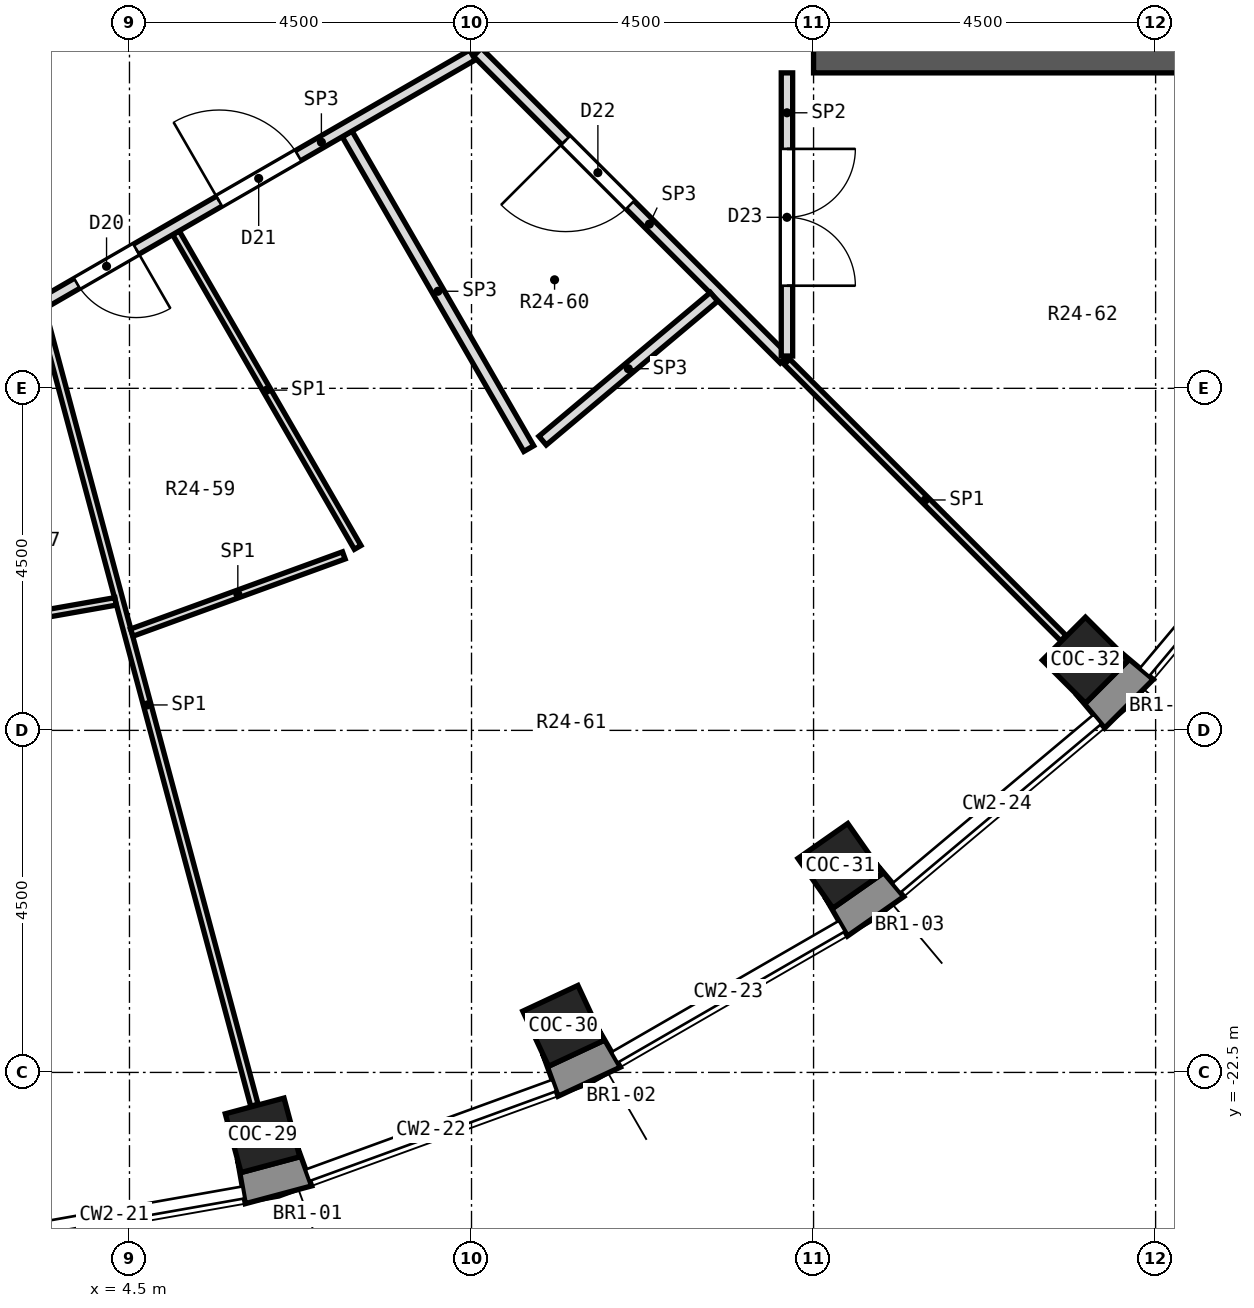
"""IFC4 building model, lengths in metres.
Left out: names, types, materials, properties, quantities, classifications, styles, units other than length and angle.
Written with IfcOpenShell. Run it as: python <this file> out.ifc"""

import sys

from ifc_helpers import new_model, si_unit, direction, frame, frame_2d, origin, origin_2d, place, context, subcontext, project, spatial, polyline, rectangle, outline, extrude, element, fill, save


model = new_model("IFC4")
c1 = context("Model", 3, precision=1e-05, world=origin(), true_north=direction((0.0, 1.0)))
c2 = subcontext(c1, "Body", "Model", "MODEL_VIEW")
j1 = project(units=[si_unit("LENGTHUNIT", "METRE"), si_unit("PLANEANGLEUNIT", "RADIAN")], contexts=[c1])
p1 = place(None, origin())
s1 = spatial("IfcSite", under=j1, at=p1, CompositionType="ELEMENT")
p2 = place(p1, origin())
s2 = spatial("IfcBuilding", under=s1, at=p2, CompositionType="ELEMENT")
p3 = place(p2, frame((0.0, 0.0, 155.8)))
s3 = spatial("IfcBuildingStorey", under=s2, at=p3, CompositionType="ELEMENT", Elevation=155.8)
for number, where, z_axis, x_axis in (
    (1, (6.25, -23.327, -0.55), (0.0, 0.0, 1.0), (0.259, -0.966, 0.0)),
    (2, (10.206, -21.887, -0.55), (0.0, 0.0, 1.0), (0.423, -0.906, 0.0)),
    (3, (13.852, -19.782, -0.55), (0.0, 0.0, 1.0), (0.574, -0.819, 0.0)),
    (4, (17.077, -17.077, -0.55), (0.0, 0.0, 1.0), (0.707, -0.707, 0.0)),
):
    element("IfcColumn", number, at=place(p3, frame(where, z_axis=z_axis, x_axis=x_axis)), inside=s3, PredefinedType="COLUMN", context=c2, shape_type="SweptSolid", body=[
        extrude(rectangle(XDim=0.8, YDim=0.8, at=origin_2d()), origin(), (0.0, 0.0, 1.0), 5.55),
    ])
p4 = place(p3, frame((13.5, -9.0, 0.0), z_axis=(0.0, 0.0, 1.0), x_axis=(1.0, 0.0, 0.0)))
e5 = element("IfcWall", 5, at=p4, inside=s3, PredefinedType="SHEAR", context=c2, shape_type="SweptSolid", body=[
    extrude(rectangle(XDim=8.0, YDim=0.7, at=frame_2d((4.0, 0.0))), origin(), (0.0, 0.0, 1.0), 5.0),
])
p5 = place(p3, origin())
e6 = element("IfcWall", 6, at=p5, inside=s3, PredefinedType="SOLIDWALL", context=c2, shape_type="SweptSolid", body=[
    extrude(outline(polyline([(6.023, -24.227), (6.897, -23.993), (6.692, -23.429), (6.74, -23.61), (5.968, -23.817), (5.919, -23.636), (6.023, -24.227)])), origin(), (0.0, 0.0, 1.0), 4.55),
])
p6 = place(p3, origin())
e7 = element("IfcWall", 7, at=p6, inside=s3, PredefinedType="SOLIDWALL", context=c2, shape_type="SweptSolid", body=[
    extrude(outline(polyline([(10.959, -22.431), (10.659, -21.911), (10.738, -22.081), (10.013, -22.419), (9.934, -22.249), (10.139, -22.813), (10.959, -22.431)])), origin(), (0.0, 0.0, 1.0), 4.55),
])
p7 = place(p3, origin())
e8 = element("IfcWall", 8, at=p7, inside=s3, PredefinedType="SOLIDWALL", context=c2, shape_type="SweptSolid", body=[
    extrude(outline(polyline([(13.946, -20.706), (14.687, -20.187), (14.302, -19.727), (14.409, -19.881), (13.754, -20.34), (13.646, -20.186), (13.946, -20.706)])), origin(), (0.0, 0.0, 1.0), 4.55),
])
p8 = place(p3, origin())
e9 = element("IfcWall", 9, at=p8, inside=s3, PredefinedType="SOLIDWALL", context=c2, shape_type="SweptSolid", body=[
    extrude(outline(polyline([(17.969, -17.33), (17.51, -16.944), (17.642, -17.077), (17.077, -17.642), (16.944, -17.51), (17.33, -17.969), (17.969, -17.33)])), origin(), (0.0, 0.0, 1.0), 4.55),
])
p9 = place(p3, frame((3.323, -12.4, 0.0), z_axis=(0.0, 0.0, 1.0), x_axis=(0.258724519119, -0.965951149493, 0.0)))
e10 = element("IfcWall", 10, at=p9, inside=s3, PredefinedType="PARTITIONING", context=c2, shape_type="SweptSolid", body=[
    extrude(rectangle(XDim=10.903, YDim=0.1, at=frame_2d((5.451, 0.0))), origin(), (0.0, 0.0, 1.0), 4.55),
])
p10 = place(p3, frame((5.112, -11.454, 0.0), z_axis=(0.0, 0.0, 1.0), x_axis=(0.500099733259, -0.865967815103, 0.0)))
e11 = element("IfcWall", 11, at=p10, inside=s3, PredefinedType="PARTITIONING", context=c2, shape_type="SweptSolid", body=[
    extrude(rectangle(XDim=4.78, YDim=0.1, at=frame_2d((2.39, 0.0))), origin(), (0.0, 0.0, 1.0), 4.55),
])
p11 = place(p3, frame((7.364, -10.153, 0.0), z_axis=(0.0, 0.0, 1.0), x_axis=(0.49988015136, -0.866094587373, 0.0)))
e12 = element("IfcWall", 12, at=p11, inside=s3, PredefinedType="PARTITIONING", context=c2, shape_type="SweptSolid", body=[
    extrude(rectangle(XDim=4.78, YDim=0.15, at=frame_2d((2.39, 0.0))), origin(), (0.0, 0.0, 1.0), 4.55),
])
p12 = place(p3, frame((13.15, -13.15, 0.0), z_axis=(0.0, 0.0, 1.0), x_axis=(0.707106781187, -0.707106781187, 0.0)))
e13 = element("IfcWall", 13, at=p12, inside=s3, PredefinedType="PARTITIONING", context=c2, shape_type="SweptSolid", body=[
    extrude(rectangle(XDim=5.143, YDim=0.1, at=frame_2d((2.572, 0.0))), origin(), (0.0, 0.0, 1.0), 4.55),
])
p13 = place(p3, frame((9.077, -9.077, 0.0), z_axis=(0.0, 0.0, 1.0), x_axis=(0.707106781187, -0.707106781187, 0.0)))
e14 = element("IfcWall", 14, at=p13, inside=s3, PredefinedType="PARTITIONING", context=c2, shape_type="SweptSolid", body=[
    extrude(rectangle(XDim=5.71, YDim=0.15, at=frame_2d((2.855, 0.0))), origin(), (0.0, 0.0, 1.0), 4.55),
])
p14 = place(p13, frame((1.642, 0.0, 0.0)))
e15 = element("IfcOpeningElement", 15, at=p14, cuts=e14, PredefinedType="OPENING", context=c2, shape_type="SweptSolid", body=[
    extrude(rectangle(XDim=1.2, YDim=2.1, at=frame_2d((0.6, 1.05))), frame((0.0, 0.087, 0.0), z_axis=(0.0, -1.0, 0.0), x_axis=(1.0, 0.0, 0.0)), (0.0, 0.0, 1.0), 0.174),
])
p15 = place(p3, frame((2.225, -16.671, 0.0), z_axis=(0.0, 0.0, 1.0), x_axis=(0.984822876139, 0.173562388302, 0.0)))
e16 = element("IfcWall", 16, at=p15, inside=s3, PredefinedType="PARTITIONING", context=c2, shape_type="SweptSolid", body=[
    extrude(rectangle(XDim=2.124, YDim=0.1, at=frame_2d((1.062, 0.0))), origin(), (0.0, 0.0, 1.0), 4.55),
])
p16 = place(p3, frame((4.53, -16.714, 0.0), z_axis=(0.0, 0.0, 1.0), x_axis=(0.939651702054, 0.342132545699, 0.0)))
e17 = element("IfcWall", 17, at=p16, inside=s3, PredefinedType="PARTITIONING", context=c2, shape_type="SweptSolid", body=[
    extrude(rectangle(XDim=2.969, YDim=0.1, at=frame_2d((1.485, 0.0))), origin(), (0.0, 0.0, 1.0), 4.55),
])
p17 = place(p3, frame((3.388, -12.363, 0.0), z_axis=(0.0, 0.0, 1.0), x_axis=(0.865967095912, 0.5001009786, 0.0)))
e18 = element("IfcWall", 18, at=p17, inside=s3, PredefinedType="PARTITIONING", context=c2, shape_type="SweptSolid", body=[
    extrude(rectangle(XDim=6.495, YDim=0.15, at=frame_2d((3.248, 0.0))), origin(), (0.0, 0.0, 1.0), 4.55),
])
p18 = place(p17, frame((0.486, 0.0, 0.0)))
e19 = element("IfcOpeningElement", 19, at=p18, cuts=e18, PredefinedType="OPENING", context=c2, shape_type="SweptSolid", body=[
    extrude(rectangle(XDim=0.9, YDim=2.1, at=frame_2d((0.45, 1.05))), frame((0.0, 0.087, 0.0), z_axis=(0.0, -1.0, 0.0), x_axis=(1.0, 0.0, 0.0)), (0.0, 0.0, 1.0), 0.174),
])
p19 = place(p17, frame((2.647, 0.0, 0.0)))
e20 = element("IfcOpeningElement", 20, at=p19, cuts=e18, PredefinedType="OPENING", context=c2, shape_type="SweptSolid", body=[
    extrude(rectangle(XDim=1.2, YDim=2.1, at=frame_2d((0.6, 1.05))), frame((0.0, 0.087, 0.0), z_axis=(0.0, -1.0, 0.0), x_axis=(1.0, 0.0, 0.0)), (0.0, 0.0, 1.0), 0.174),
])
p20 = place(p3, frame((9.935, -14.188, 0.0), z_axis=(0.0, 0.0, 1.0), x_axis=(0.766150707514, 0.642660947448, 0.0)))
e21 = element("IfcWall", 21, at=p20, inside=s3, PredefinedType="PARTITIONING", context=c2, shape_type="SweptSolid", body=[
    extrude(rectangle(XDim=2.944, YDim=0.15, at=frame_2d((1.472, 0.0))), origin(), (0.0, 0.0, 1.0), 4.55),
])
p21 = place(p3, frame((13.15, -13.075, 0.0), z_axis=(0.0, 0.0, 1.0), x_axis=(0.0, 1.0, 0.0)))
e22 = element("IfcWall", 22, at=p21, inside=s3, PredefinedType="PARTITIONING", context=c2, shape_type="SweptSolid", body=[
    extrude(rectangle(XDim=3.725, YDim=0.15, at=frame_2d((1.862, 0.0))), origin(), (0.0, 0.0, 1.0), 4.55),
])
p22 = place(p21, frame((0.925, 0.0, 0.0)))
e23 = element("IfcOpeningElement", 23, at=p22, cuts=e22, PredefinedType="OPENING", context=c2, shape_type="SweptSolid", body=[
    extrude(rectangle(XDim=1.8, YDim=2.1, at=frame_2d((0.9, 1.05))), frame((0.0, 0.087, 0.0), z_axis=(0.0, -1.0, 0.0), x_axis=(1.0, 0.0, 0.0)), (0.0, 0.0, 1.0), 0.174),
])
p23 = place(p18, frame((0.9, 0.0, 0.0), z_axis=(0.0, 0.0, 1.0), x_axis=(-1.0, 0.0, 0.0)))
e24 = element("IfcDoor", 24, at=p23, inside=s3, OperationType="SINGLE_SWING_LEFT", PredefinedType="DOOR", context=c2, shape_type="SweptSolid", body=[
    extrude(rectangle(XDim=0.9, YDim=2.1, at=frame_2d((0.45, 1.05))), frame((0.0, 0.025, 0.0), z_axis=(0.0, -1.0, 0.0), x_axis=(1.0, 0.0, 0.0)), (0.0, 0.0, 1.0), 0.05),
])
fill(e19, e24)
p24 = place(p19, origin())
e25 = element("IfcDoor", 25, at=p24, inside=s3, OperationType="SINGLE_SWING_LEFT", PredefinedType="DOOR", context=c2, shape_type="SweptSolid", body=[
    extrude(rectangle(XDim=1.2, YDim=2.1, at=frame_2d((0.6, 1.05))), frame((0.0, 0.025, 0.0), z_axis=(0.0, -1.0, 0.0), x_axis=(1.0, 0.0, 0.0)), (0.0, 0.0, 1.0), 0.05),
])
fill(e20, e25)
p25 = place(p14, frame((1.2, 0.0, 0.0), z_axis=(0.0, 0.0, 1.0), x_axis=(-1.0, 0.0, 0.0)))
e26 = element("IfcDoor", 26, at=p25, inside=s3, OperationType="SINGLE_SWING_RIGHT", PredefinedType="DOOR", context=c2, shape_type="SweptSolid", body=[
    extrude(rectangle(XDim=1.2, YDim=2.1, at=frame_2d((0.6, 1.05))), frame((0.0, 0.025, 0.0), z_axis=(0.0, -1.0, 0.0), x_axis=(1.0, 0.0, 0.0)), (0.0, 0.0, 1.0), 0.05),
])
fill(e15, e26)
p26 = place(p22, frame((1.8, 0.0, 0.0), z_axis=(0.0, 0.0, 1.0), x_axis=(-1.0, 0.0, 0.0)))
e27 = element("IfcDoor", 27, at=p26, inside=s3, OperationType="DOUBLE_DOOR_SINGLE_SWING", PredefinedType="DOOR", context=c2, shape_type="SweptSolid", body=[
    extrude(rectangle(XDim=1.8, YDim=2.1, at=frame_2d((0.9, 1.05))), frame((0.0, 0.025, 0.0), z_axis=(0.0, -1.0, 0.0), x_axis=(1.0, 0.0, 0.0)), (0.0, 0.0, 1.0), 0.05),
])
fill(e23, e27)
save(model, sys.argv[1])
